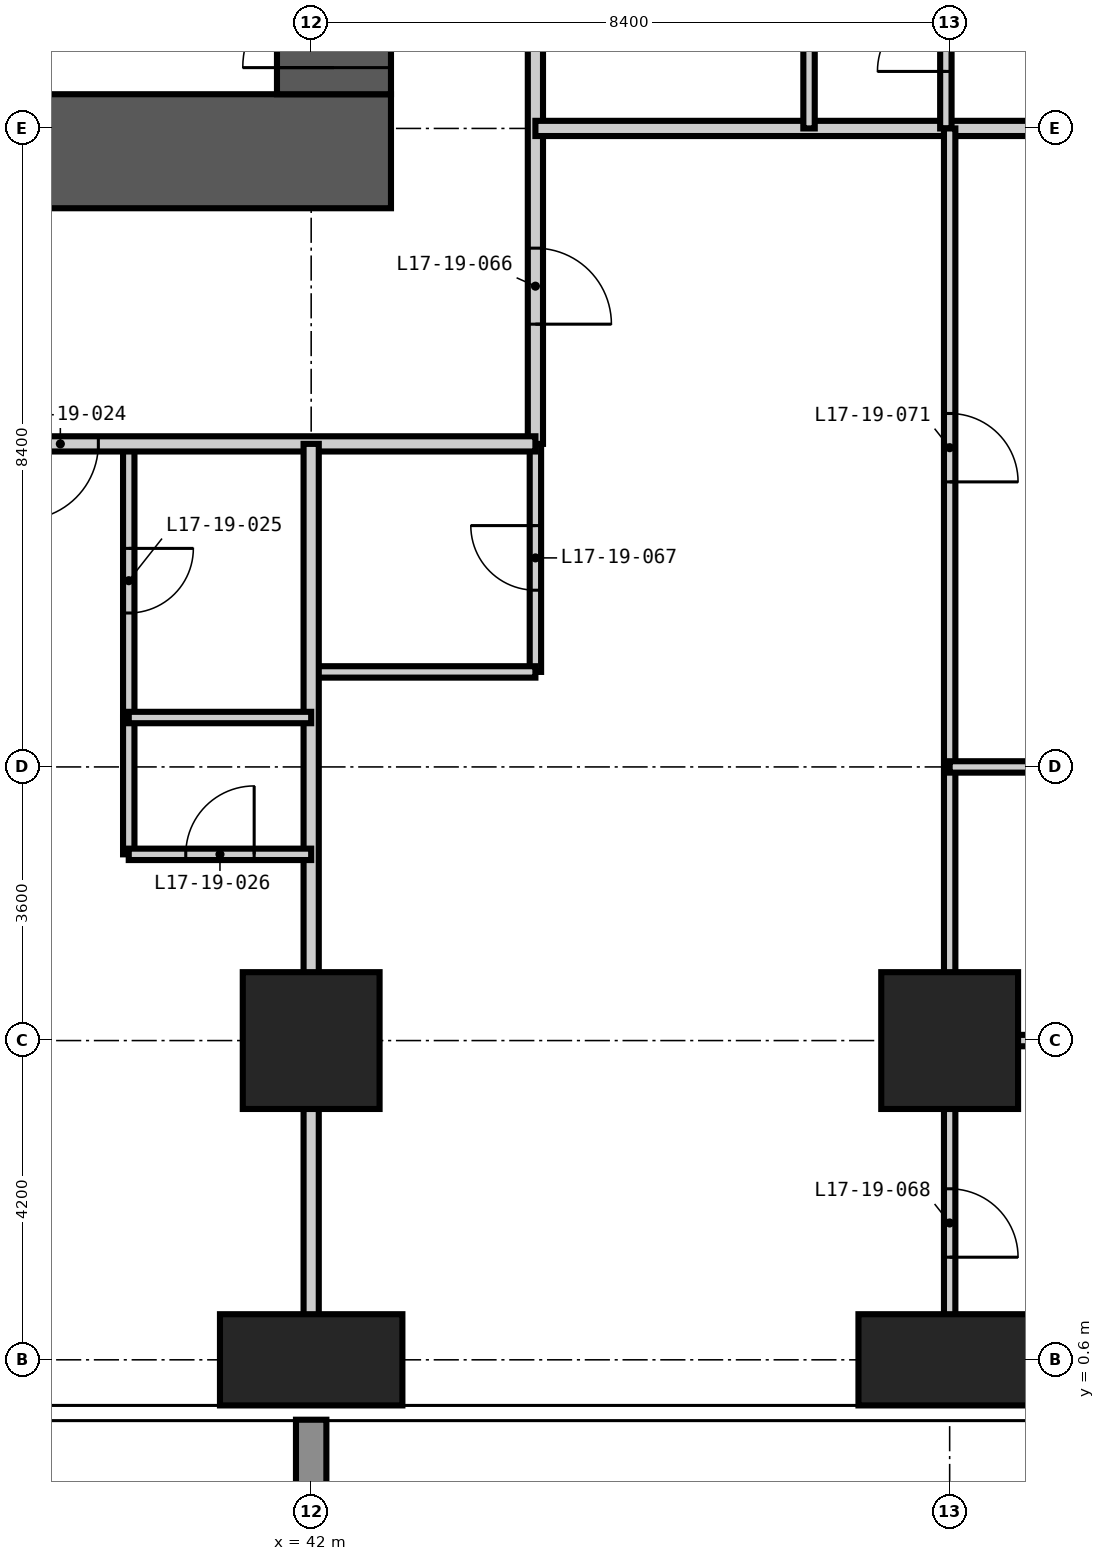
"""IFC4 building model, lengths in metres.
Left out: names, types, materials, properties, quantities, classifications, styles, units other than length and angle.
Written with IfcOpenShell. Run it as: python <this file> out.ifc"""

import sys

from ifc_helpers import new_model, si_unit, direction, frame, frame_2d, origin, origin_2d, place, context, subcontext, project, spatial, rectangle, extrude, element, fill, save


model = new_model("IFC4")
c1 = context("Model", 3, precision=1e-05, world=origin(), true_north=direction((0.0, 1.0)))
c2 = subcontext(c1, "Body", "Model", "MODEL_VIEW")
j1 = project(units=[si_unit("LENGTHUNIT", "METRE"), si_unit("PLANEANGLEUNIT", "RADIAN")], contexts=[c1])
p1 = place(None, origin())
s1 = spatial("IfcSite", under=j1, at=p1, CompositionType="ELEMENT")
p2 = place(p1, origin())
s2 = spatial("IfcBuilding", under=s1, at=p2, CompositionType="ELEMENT")
p3 = place(p2, frame((0.0, 0.0, 70.2)))
s3 = spatial("IfcBuildingStorey", under=s2, at=p3, CompositionType="ELEMENT", Elevation=70.2)
p4 = place(p3, frame((42.0, 0.6, -0.35), z_axis=(0.0, 0.0, 1.0), x_axis=(1.0, 0.0, 0.0)))
e1 = element("IfcColumn", 1, at=p4, inside=s3, PredefinedType="COLUMN", context=c2, shape_type="SweptSolid", body=[
    extrude(rectangle(XDim=2.4, YDim=1.2, at=origin_2d()), origin(), (0.0, 0.0, 1.0), 3.6),
])
p5 = place(p3, frame((42.0, 4.8, -0.35), z_axis=(0.0, 0.0, 1.0), x_axis=(1.0, 0.0, 0.0)))
e2 = element("IfcColumn", 2, at=p5, inside=s3, PredefinedType="COLUMN", context=c2, shape_type="SweptSolid", body=[
    extrude(rectangle(XDim=1.8, YDim=1.8, at=origin_2d()), origin(), (0.0, 0.0, 1.0), 3.6),
])
p6 = place(p3, frame((50.4, 0.6, -0.35), z_axis=(0.0, 0.0, 1.0), x_axis=(1.0, 0.0, 0.0)))
e3 = element("IfcColumn", 3, at=p6, inside=s3, PredefinedType="COLUMN", context=c2, shape_type="SweptSolid", body=[
    extrude(rectangle(XDim=2.4, YDim=1.2, at=origin_2d()), origin(), (0.0, 0.0, 1.0), 3.6),
])
p7 = place(p3, frame((50.4, 4.8, -0.35), z_axis=(0.0, 0.0, 1.0), x_axis=(1.0, 0.0, 0.0)))
e4 = element("IfcColumn", 4, at=p7, inside=s3, PredefinedType="COLUMN", context=c2, shape_type="SweptSolid", body=[
    extrude(rectangle(XDim=1.8, YDim=1.8, at=origin_2d()), origin(), (0.0, 0.0, 1.0), 3.6),
])
p8 = place(p3, frame((15.75, 16.5, -0.35), z_axis=(0.0, 0.0, 1.0), x_axis=(1.0, 0.0, 0.0)))
e5 = element("IfcWall", 5, at=p8, inside=s3, PredefinedType="SHEAR", context=c2, shape_type="SweptSolid", body=[
    extrude(rectangle(XDim=27.3, YDim=1.5, at=frame_2d((13.65, 0.0))), origin(), (0.0, 0.0, 1.0), 3.6),
])
p9 = place(p8, frame((13.15, 0.0, 0.35)))
e6 = element("IfcOpeningElement", 6, at=p9, cuts=e5, PredefinedType="OPENING", context=c2, shape_type="SweptSolid", body=[
    extrude(rectangle(XDim=1.0, YDim=2.1, at=frame_2d((0.5, 1.05))), frame((0.0, 0.76, 0.0), z_axis=(0.0, -1.0, 0.0), x_axis=(1.0, 0.0, 0.0)), (0.0, 0.0, 1.0), 1.52),
])
p10 = place(p8, frame((19.45, 0.0, 0.35)))
e7 = element("IfcOpeningElement", 7, at=p10, cuts=e5, PredefinedType="OPENING", context=c2, shape_type="SweptSolid", body=[
    extrude(rectangle(XDim=1.0, YDim=2.1, at=frame_2d((0.5, 1.05))), frame((0.0, 0.76, 0.0), z_axis=(0.0, -1.0, 0.0), x_axis=(1.0, 0.0, 0.0)), (0.0, 0.0, 1.0), 1.52),
])
p11 = place(p3, frame((42.3, 17.25, -0.35), z_axis=(0.0, 0.0, 1.0), x_axis=(0.0, 1.0, 0.0)))
e8 = element("IfcWall", 8, at=p11, inside=s3, PredefinedType="SHEAR", context=c2, shape_type="SweptSolid", body=[
    extrude(rectangle(XDim=24.3, YDim=1.5, at=frame_2d((12.15, 0.0))), origin(), (0.0, 0.0, 1.0), 3.6),
])
p12 = place(p11, frame((0.35, 0.0, 0.35)))
e9 = element("IfcOpeningElement", 9, at=p12, cuts=e8, PredefinedType="OPENING", context=c2, shape_type="SweptSolid", body=[
    extrude(rectangle(XDim=1.2, YDim=2.2, at=frame_2d((0.6, 1.1))), frame((0.0, 0.76, 0.0), z_axis=(0.0, -1.0, 0.0), x_axis=(1.0, 0.0, 0.0)), (0.0, 0.0, 1.0), 1.52),
])
p13 = place(p11, frame((11.65, 0.0, 0.35)))
e10 = element("IfcOpeningElement", 10, at=p13, cuts=e8, PredefinedType="OPENING", context=c2, shape_type="SweptSolid", body=[
    extrude(rectangle(XDim=1.0, YDim=2.1, at=frame_2d((0.5, 1.05))), frame((0.0, 0.76, 0.0), z_axis=(0.0, -1.0, 0.0), x_axis=(1.0, 0.0, 0.0)), (0.0, 0.0, 1.0), 1.52),
])
p14 = place(p11, frame((20.05, 0.0, 0.35)))
e11 = element("IfcOpeningElement", 11, at=p14, cuts=e8, PredefinedType="OPENING", context=c2, shape_type="SweptSolid", body=[
    extrude(rectangle(XDim=1.0, YDim=2.1, at=frame_2d((0.5, 1.05))), frame((0.0, 0.76, 0.0), z_axis=(0.0, -1.0, 0.0), x_axis=(1.0, 0.0, 0.0)), (0.0, 0.0, 1.0), 1.52),
])
p15 = place(p3, frame((39.6, 9.05, 0.0), z_axis=(0.0, 0.0, 1.0), x_axis=(0.0, 1.0, 0.0)))
e12 = element("IfcWall", 12, at=p15, inside=s3, PredefinedType="PARTITIONING", context=c2, shape_type="SweptSolid", body=[
    extrude(rectangle(XDim=3.6, YDim=0.15, at=frame_2d((1.8, 0.0))), origin(), (0.0, 0.0, 1.0), 3.25),
])
p16 = place(p15, frame((1.375, 0.0, 0.0)))
e13 = element("IfcOpeningElement", 13, at=p16, cuts=e12, PredefinedType="OPENING", context=c2, shape_type="SweptSolid", body=[
    extrude(rectangle(XDim=0.85, YDim=2.1, at=frame_2d((0.425, 1.05))), frame((0.0, 0.085, 0.0), z_axis=(0.0, -1.0, 0.0), x_axis=(1.0, 0.0, 0.0)), (0.0, 0.0, 1.0), 0.17),
])
p17 = place(p3, frame((44.95, 9.65, 0.0), z_axis=(0.0, 0.0, 1.0), x_axis=(0.0, 1.0, 0.0)))
e14 = element("IfcWall", 14, at=p17, inside=s3, PredefinedType="PARTITIONING", context=c2, shape_type="SweptSolid", body=[
    extrude(rectangle(XDim=3.0, YDim=0.15, at=frame_2d((1.5, 0.0))), origin(), (0.0, 0.0, 1.0), 3.25),
])
p18 = place(p17, frame((1.075, 0.0, 0.0)))
e15 = element("IfcOpeningElement", 15, at=p18, cuts=e14, PredefinedType="OPENING", context=c2, shape_type="SweptSolid", body=[
    extrude(rectangle(XDim=0.85, YDim=2.1, at=frame_2d((0.425, 1.05))), frame((0.0, 0.085, 0.0), z_axis=(0.0, -1.0, 0.0), x_axis=(1.0, 0.0, 0.0)), (0.0, 0.0, 1.0), 0.17),
])
p19 = place(p3, frame((50.4, 4.8, 0.0), z_axis=(0.0, 0.0, 1.0), x_axis=(1.0, 0.0, 0.0)))
e16 = element("IfcWall", 16, at=p19, inside=s3, PredefinedType="PARTITIONING", context=c2, shape_type="SweptSolid", body=[
    extrude(rectangle(XDim=3.0, YDim=0.15, at=frame_2d((1.5, 0.0))), origin(), (0.0, 0.0, 1.0), 3.25),
])
p20 = place(p3, frame((42.0, 9.65, 0.0), z_axis=(0.0, 0.0, 1.0), x_axis=(1.0, 0.0, 0.0)))
e17 = element("IfcWall", 17, at=p20, inside=s3, PredefinedType="PARTITIONING", context=c2, shape_type="SweptSolid", body=[
    extrude(rectangle(XDim=2.95, YDim=0.15, at=frame_2d((1.475, 0.0))), origin(), (0.0, 0.0, 1.0), 3.25),
])
p21 = place(p3, frame((44.95, 45.55, 0.0), z_axis=(0.0, 0.0, 1.0), x_axis=(0.0, -1.0, 0.0)))
e18 = element("IfcWall", 18, at=p21, inside=s3, PredefinedType="PARTITIONING", context=c2, shape_type="SweptSolid", body=[
    extrude(rectangle(XDim=32.9, YDim=0.2, at=frame_2d((16.45, 0.0))), origin(), (0.0, 0.0, 1.0), 3.25),
])
p22 = place(p21, frame((24.95, 0.0, 0.0)))
e19 = element("IfcOpeningElement", 19, at=p22, cuts=e18, PredefinedType="OPENING", context=c2, shape_type="SweptSolid", body=[
    extrude(rectangle(XDim=1.0, YDim=2.2, at=frame_2d((0.5, 1.1))), frame((0.0, 0.11, 0.0), z_axis=(0.0, -1.0, 0.0), x_axis=(1.0, 0.0, 0.0)), (0.0, 0.0, 1.0), 0.22),
])
p23 = place(p21, frame((21.05, 0.0, 0.0)))
e20 = element("IfcOpeningElement", 20, at=p23, cuts=e18, PredefinedType="OPENING", context=c2, shape_type="SweptSolid", body=[
    extrude(rectangle(XDim=1.0, YDim=2.2, at=frame_2d((0.5, 1.1))), frame((0.0, 0.11, 0.0), z_axis=(0.0, -1.0, 0.0), x_axis=(1.0, 0.0, 0.0)), (0.0, 0.0, 1.0), 0.22),
])
p24 = place(p21, frame((10.25, 0.0, 0.0)))
e21 = element("IfcOpeningElement", 21, at=p24, cuts=e18, PredefinedType="OPENING", context=c2, shape_type="SweptSolid", body=[
    extrude(rectangle(XDim=1.0, YDim=2.2, at=frame_2d((0.5, 1.1))), frame((0.0, 0.11, 0.0), z_axis=(0.0, -1.0, 0.0), x_axis=(1.0, 0.0, 0.0)), (0.0, 0.0, 1.0), 0.22),
])
p25 = place(p21, frame((6.35, 0.0, 0.0)))
e22 = element("IfcOpeningElement", 22, at=p25, cuts=e18, PredefinedType="OPENING", context=c2, shape_type="SweptSolid", body=[
    extrude(rectangle(XDim=1.0, YDim=2.2, at=frame_2d((0.5, 1.1))), frame((0.0, 0.11, 0.0), z_axis=(0.0, -1.0, 0.0), x_axis=(1.0, 0.0, 0.0)), (0.0, 0.0, 1.0), 0.22),
])
p26 = place(p21, frame((30.325, 0.0, 0.0)))
e23 = element("IfcOpeningElement", 23, at=p26, cuts=e18, PredefinedType="OPENING", context=c2, shape_type="SweptSolid", body=[
    extrude(rectangle(XDim=1.0, YDim=2.2, at=frame_2d((0.5, 1.1))), frame((0.0, 0.11, 0.0), z_axis=(0.0, -1.0, 0.0), x_axis=(1.0, 0.0, 0.0)), (0.0, 0.0, 1.0), 0.22),
])
p27 = place(p21, frame((1.275, 0.0, 0.0)))
e24 = element("IfcOpeningElement", 24, at=p27, cuts=e18, PredefinedType="OPENING", context=c2, shape_type="SweptSolid", body=[
    extrude(rectangle(XDim=1.0, YDim=2.2, at=frame_2d((0.5, 1.1))), frame((0.0, 0.11, 0.0), z_axis=(0.0, -1.0, 0.0), x_axis=(1.0, 0.0, 0.0)), (0.0, 0.0, 1.0), 0.22),
])
p28 = place(p3, frame((44.95, 12.65, 0.0), z_axis=(0.0, 0.0, 1.0), x_axis=(-1.0, 0.0, 0.0)))
e25 = element("IfcWall", 25, at=p28, inside=s3, PredefinedType="PARTITIONING", context=c2, shape_type="SweptSolid", body=[
    extrude(rectangle(XDim=32.3, YDim=0.2, at=frame_2d((16.15, 0.0))), origin(), (0.0, 0.0, 1.0), 3.25),
])
p29 = place(p28, frame((24.35, 0.0, 0.0)))
e26 = element("IfcOpeningElement", 26, at=p29, cuts=e25, PredefinedType="OPENING", context=c2, shape_type="SweptSolid", body=[
    extrude(rectangle(XDim=1.0, YDim=2.2, at=frame_2d((0.5, 1.1))), frame((0.0, 0.11, 0.0), z_axis=(0.0, -1.0, 0.0), x_axis=(1.0, 0.0, 0.0)), (0.0, 0.0, 1.0), 0.22),
])
p30 = place(p28, frame((22.55, 0.0, 0.0)))
e27 = element("IfcOpeningElement", 27, at=p30, cuts=e25, PredefinedType="OPENING", context=c2, shape_type="SweptSolid", body=[
    extrude(rectangle(XDim=1.0, YDim=2.2, at=frame_2d((0.5, 1.1))), frame((0.0, 0.11, 0.0), z_axis=(0.0, -1.0, 0.0), x_axis=(1.0, 0.0, 0.0)), (0.0, 0.0, 1.0), 0.22),
])
p31 = place(p28, frame((15.95, 0.0, 0.0)))
e28 = element("IfcOpeningElement", 28, at=p31, cuts=e25, PredefinedType="OPENING", context=c2, shape_type="SweptSolid", body=[
    extrude(rectangle(XDim=1.0, YDim=2.2, at=frame_2d((0.5, 1.1))), frame((0.0, 0.11, 0.0), z_axis=(0.0, -1.0, 0.0), x_axis=(1.0, 0.0, 0.0)), (0.0, 0.0, 1.0), 0.22),
])
p32 = place(p28, frame((14.15, 0.0, 0.0)))
e29 = element("IfcOpeningElement", 29, at=p32, cuts=e25, PredefinedType="OPENING", context=c2, shape_type="SweptSolid", body=[
    extrude(rectangle(XDim=1.0, YDim=2.2, at=frame_2d((0.5, 1.1))), frame((0.0, 0.11, 0.0), z_axis=(0.0, -1.0, 0.0), x_axis=(1.0, 0.0, 0.0)), (0.0, 0.0, 1.0), 0.22),
])
p33 = place(p28, frame((7.55, 0.0, 0.0)))
e30 = element("IfcOpeningElement", 30, at=p33, cuts=e25, PredefinedType="OPENING", context=c2, shape_type="SweptSolid", body=[
    extrude(rectangle(XDim=1.0, YDim=2.2, at=frame_2d((0.5, 1.1))), frame((0.0, 0.11, 0.0), z_axis=(0.0, -1.0, 0.0), x_axis=(1.0, 0.0, 0.0)), (0.0, 0.0, 1.0), 0.22),
])
p34 = place(p28, frame((5.75, 0.0, 0.0)))
e31 = element("IfcOpeningElement", 31, at=p34, cuts=e25, PredefinedType="OPENING", context=c2, shape_type="SweptSolid", body=[
    extrude(rectangle(XDim=1.0, YDim=2.2, at=frame_2d((0.5, 1.1))), frame((0.0, 0.11, 0.0), z_axis=(0.0, -1.0, 0.0), x_axis=(1.0, 0.0, 0.0)), (0.0, 0.0, 1.0), 0.22),
])
p35 = place(p3, frame((42.0, -0.008, 0.0), z_axis=(0.0, 0.0, 1.0), x_axis=(0.0, 1.0, 0.0)))
e32 = element("IfcWall", 32, at=p35, inside=s3, PredefinedType="PARTITIONING", context=c2, shape_type="SweptSolid", body=[
    extrude(rectangle(XDim=12.658, YDim=0.2, at=frame_2d((6.329, 0.0))), origin(), (0.0, 0.0, 1.0), 3.25),
])
p36 = place(p3, frame((44.95, 16.8, 0.0), z_axis=(0.0, 0.0, 1.0), x_axis=(1.0, 0.0, 0.0)))
e33 = element("IfcWall", 33, at=p36, inside=s3, PredefinedType="PARTITIONING", context=c2, shape_type="SweptSolid", body=[
    extrude(rectangle(XDim=5.4, YDim=0.2, at=frame_2d((2.7, 0.0))), origin(), (0.0, 0.0, 1.0), 3.25),
])
p37 = place(p3, frame((50.4, 16.8, 0.0), z_axis=(0.0, 0.0, 1.0), x_axis=(1.0, 0.0, 0.0)))
e34 = element("IfcWall", 34, at=p37, inside=s3, PredefinedType="PARTITIONING", context=c2, shape_type="SweptSolid", body=[
    extrude(rectangle(XDim=8.408, YDim=0.2, at=frame_2d((4.204, 0.0))), origin(), (0.0, 0.0, 1.0), 3.25),
])
p38 = place(p3, frame((39.6, 7.25, 0.0), z_axis=(0.0, 0.0, 1.0), x_axis=(0.0, 1.0, 0.0)))
e35 = element("IfcWall", 35, at=p38, inside=s3, PredefinedType="PARTITIONING", context=c2, shape_type="SweptSolid", body=[
    extrude(rectangle(XDim=1.8, YDim=0.15, at=frame_2d((0.9, 0.0))), origin(), (0.0, 0.0, 1.0), 3.25),
])
p39 = place(p3, frame((48.55, 16.8, 0.0), z_axis=(0.0, 0.0, 1.0), x_axis=(0.0, 1.0, 0.0)))
e36 = element("IfcWall", 36, at=p39, inside=s3, PredefinedType="PARTITIONING", context=c2, shape_type="SweptSolid", body=[
    extrude(rectangle(XDim=2.4, YDim=0.15, at=frame_2d((1.2, 0.0))), origin(), (0.0, 0.0, 1.0), 3.25),
])
p40 = place(p3, frame((50.35, 16.8, 0.0), z_axis=(0.0, 0.0, 1.0), x_axis=(0.0, 1.0, 0.0)))
e37 = element("IfcWall", 37, at=p40, inside=s3, PredefinedType="PARTITIONING", context=c2, shape_type="SweptSolid", body=[
    extrude(rectangle(XDim=2.4, YDim=0.15, at=frame_2d((1.2, 0.0))), origin(), (0.0, 0.0, 1.0), 3.25),
])
p41 = place(p40, frame((0.75, 0.0, 0.0)))
e38 = element("IfcOpeningElement", 38, at=p41, cuts=e37, PredefinedType="OPENING", context=c2, shape_type="SweptSolid", body=[
    extrude(rectangle(XDim=0.9, YDim=2.1, at=frame_2d((0.45, 1.05))), frame((0.0, 0.085, 0.0), z_axis=(0.0, -1.0, 0.0), x_axis=(1.0, 0.0, 0.0)), (0.0, 0.0, 1.0), 0.17),
])
p42 = place(p3, frame((50.4, -0.008, 0.0), z_axis=(0.0, 0.0, 1.0), x_axis=(0.0, 1.0, 0.0)))
e39 = element("IfcWall", 39, at=p42, inside=s3, PredefinedType="PARTITIONING", context=c2, shape_type="SweptSolid", body=[
    extrude(rectangle(XDim=16.808, YDim=0.15, at=frame_2d((8.404, 0.0))), origin(), (0.0, 0.0, 1.0), 3.25),
])
p43 = place(p42, frame((1.958, 0.0, 0.0)))
e40 = element("IfcOpeningElement", 40, at=p43, cuts=e39, PredefinedType="OPENING", context=c2, shape_type="SweptSolid", body=[
    extrude(rectangle(XDim=0.9, YDim=2.1, at=frame_2d((0.45, 1.05))), frame((0.0, 0.085, 0.0), z_axis=(0.0, -1.0, 0.0), x_axis=(1.0, 0.0, 0.0)), (0.0, 0.0, 1.0), 0.17),
])
p44 = place(p42, frame((12.158, 0.0, 0.0)))
e41 = element("IfcOpeningElement", 41, at=p44, cuts=e39, PredefinedType="OPENING", context=c2, shape_type="SweptSolid", body=[
    extrude(rectangle(XDim=0.9, YDim=2.1, at=frame_2d((0.45, 1.05))), frame((0.0, 0.085, 0.0), z_axis=(0.0, -1.0, 0.0), x_axis=(1.0, 0.0, 0.0)), (0.0, 0.0, 1.0), 0.17),
])
p45 = place(p3, frame((39.6, 7.25, 0.0), z_axis=(0.0, 0.0, 1.0), x_axis=(1.0, 0.0, 0.0)))
e42 = element("IfcWall", 42, at=p45, inside=s3, PredefinedType="PARTITIONING", context=c2, shape_type="SweptSolid", body=[
    extrude(rectangle(XDim=2.4, YDim=0.15, at=frame_2d((1.2, 0.0))), origin(), (0.0, 0.0, 1.0), 3.25),
])
p46 = place(p45, frame((0.75, 0.0, 0.0)))
e43 = element("IfcOpeningElement", 43, at=p46, cuts=e42, PredefinedType="OPENING", context=c2, shape_type="SweptSolid", body=[
    extrude(rectangle(XDim=0.9, YDim=2.1, at=frame_2d((0.45, 1.05))), frame((0.0, 0.085, 0.0), z_axis=(0.0, -1.0, 0.0), x_axis=(1.0, 0.0, 0.0)), (0.0, 0.0, 1.0), 0.17),
])
p47 = place(p3, frame((50.4, 8.4, 0.0), z_axis=(0.0, 0.0, 1.0), x_axis=(1.0, 0.0, 0.0)))
e44 = element("IfcWall", 44, at=p47, inside=s3, PredefinedType="PARTITIONING", context=c2, shape_type="SweptSolid", body=[
    extrude(rectangle(XDim=8.408, YDim=0.15, at=frame_2d((4.204, 0.0))), origin(), (0.0, 0.0, 1.0), 3.25),
])
p48 = place(p47, frame((4.55, 0.0, 0.0)))
e45 = element("IfcOpeningElement", 45, at=p48, cuts=e44, PredefinedType="OPENING", context=c2, shape_type="SweptSolid", body=[
    extrude(rectangle(XDim=0.9, YDim=2.1, at=frame_2d((0.45, 1.05))), frame((0.0, 0.085, 0.0), z_axis=(0.0, -1.0, 0.0), x_axis=(1.0, 0.0, 0.0)), (0.0, 0.0, 1.0), 0.17),
])
p49 = place(p3, frame((39.6, 9.05, 0.0), z_axis=(0.0, 0.0, 1.0), x_axis=(1.0, 0.0, 0.0)))
e46 = element("IfcWall", 46, at=p49, inside=s3, PredefinedType="PARTITIONING", context=c2, shape_type="SweptSolid", body=[
    extrude(rectangle(XDim=2.4, YDim=0.15, at=frame_2d((1.2, 0.0))), origin(), (0.0, 0.0, 1.0), 3.25),
])
p50 = place(p12, origin())
e47 = element("IfcDoor", 47, at=p50, inside=s3, OperationType="SINGLE_SWING_LEFT", PredefinedType="DOOR", context=c2, shape_type="SweptSolid", body=[
    extrude(rectangle(XDim=1.2, YDim=2.2, at=frame_2d((0.6, 1.1))), frame((0.0, 0.025, 0.0), z_axis=(0.0, -1.0, 0.0), x_axis=(1.0, 0.0, 0.0)), (0.0, 0.0, 1.0), 0.05),
])
fill(e9, e47)
p51 = place(p34, origin())
e48 = element("IfcDoor", 48, at=p51, inside=s3, OperationType="SINGLE_SWING_RIGHT", PredefinedType="DOOR", context=c2, shape_type="SweptSolid", body=[
    extrude(rectangle(XDim=1.0, YDim=2.2, at=frame_2d((0.5, 1.1))), frame((0.0, 0.025, 0.0), z_axis=(0.0, -1.0, 0.0), x_axis=(1.0, 0.0, 0.0)), (0.0, 0.0, 1.0), 0.05),
])
fill(e31, e48)
p52 = place(p16, frame((0.85, 0.0, 0.0), z_axis=(0.0, 0.0, 1.0), x_axis=(-1.0, 0.0, 0.0)))
e49 = element("IfcDoor", 49, at=p52, inside=s3, OperationType="SINGLE_SWING_LEFT", PredefinedType="DOOR", context=c2, shape_type="SweptSolid", body=[
    extrude(rectangle(XDim=0.85, YDim=2.1, at=frame_2d((0.425, 1.05))), frame((0.0, 0.025, 0.0), z_axis=(0.0, -1.0, 0.0), x_axis=(1.0, 0.0, 0.0)), (0.0, 0.0, 1.0), 0.05),
])
fill(e13, e49)
p53 = place(p46, origin())
e50 = element("IfcDoor", 50, at=p53, inside=s3, OperationType="SINGLE_SWING_RIGHT", PredefinedType="DOOR", context=c2, shape_type="SweptSolid", body=[
    extrude(rectangle(XDim=0.9, YDim=2.1, at=frame_2d((0.45, 1.05))), frame((0.0, 0.025, 0.0), z_axis=(0.0, -1.0, 0.0), x_axis=(1.0, 0.0, 0.0)), (0.0, 0.0, 1.0), 0.05),
])
fill(e43, e50)
p54 = place(p41, origin())
e51 = element("IfcDoor", 51, at=p54, inside=s3, OperationType="SINGLE_SWING_LEFT", PredefinedType="DOOR", context=c2, shape_type="SweptSolid", body=[
    extrude(rectangle(XDim=0.9, YDim=2.1, at=frame_2d((0.45, 1.05))), frame((0.0, 0.025, 0.0), z_axis=(0.0, -1.0, 0.0), x_axis=(1.0, 0.0, 0.0)), (0.0, 0.0, 1.0), 0.05),
])
fill(e38, e51)
p55 = place(p26, origin())
e52 = element("IfcDoor", 52, at=p55, inside=s3, OperationType="SINGLE_SWING_RIGHT", PredefinedType="DOOR", context=c2, shape_type="SweptSolid", body=[
    extrude(rectangle(XDim=1.0, YDim=2.2, at=frame_2d((0.5, 1.1))), frame((0.0, 0.025, 0.0), z_axis=(0.0, -1.0, 0.0), x_axis=(1.0, 0.0, 0.0)), (0.0, 0.0, 1.0), 0.05),
])
fill(e23, e52)
p56 = place(p18, origin())
e53 = element("IfcDoor", 53, at=p56, inside=s3, OperationType="SINGLE_SWING_RIGHT", PredefinedType="DOOR", context=c2, shape_type="SweptSolid", body=[
    extrude(rectangle(XDim=0.85, YDim=2.1, at=frame_2d((0.425, 1.05))), frame((0.0, 0.025, 0.0), z_axis=(0.0, -1.0, 0.0), x_axis=(1.0, 0.0, 0.0)), (0.0, 0.0, 1.0), 0.05),
])
fill(e15, e53)
p57 = place(p43, frame((0.9, 0.0, 0.0), z_axis=(0.0, 0.0, 1.0), x_axis=(-1.0, 0.0, 0.0)))
e54 = element("IfcDoor", 54, at=p57, inside=s3, OperationType="SINGLE_SWING_RIGHT", PredefinedType="DOOR", context=c2, shape_type="SweptSolid", body=[
    extrude(rectangle(XDim=0.9, YDim=2.1, at=frame_2d((0.45, 1.05))), frame((0.0, 0.025, 0.0), z_axis=(0.0, -1.0, 0.0), x_axis=(1.0, 0.0, 0.0)), (0.0, 0.0, 1.0), 0.05),
])
fill(e40, e54)
p58 = place(p44, frame((0.9, 0.0, 0.0), z_axis=(0.0, 0.0, 1.0), x_axis=(-1.0, 0.0, 0.0)))
e55 = element("IfcDoor", 55, at=p58, inside=s3, OperationType="SINGLE_SWING_RIGHT", PredefinedType="DOOR", context=c2, shape_type="SweptSolid", body=[
    extrude(rectangle(XDim=0.9, YDim=2.1, at=frame_2d((0.45, 1.05))), frame((0.0, 0.025, 0.0), z_axis=(0.0, -1.0, 0.0), x_axis=(1.0, 0.0, 0.0)), (0.0, 0.0, 1.0), 0.05),
])
fill(e41, e55)
save(model, sys.argv[1])
